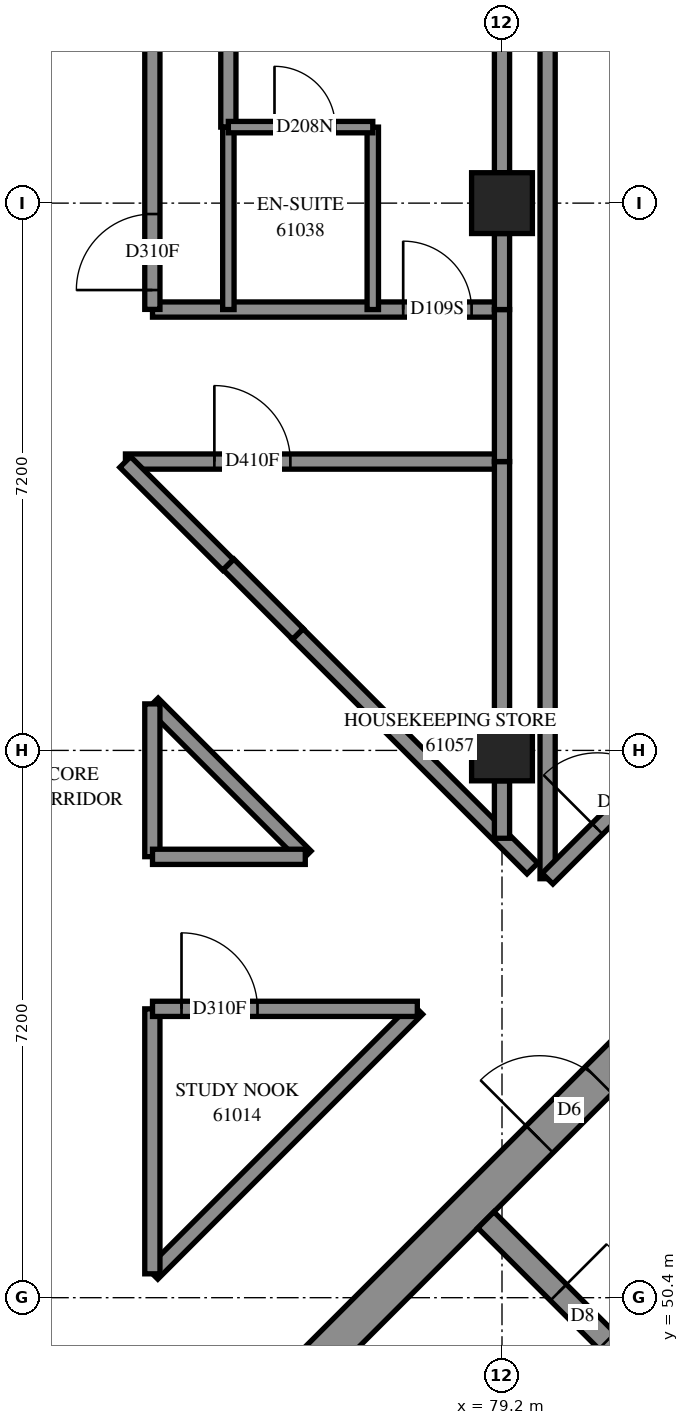
"""IFC4 building model, lengths in metres.
Left out: names, types, materials, properties, quantities, classifications, styles, units other than length and angle.
Written with IfcOpenShell. Run it as: python <this file> out.ifc"""

import sys

from ifc_helpers import new_model, si_unit, direction, frame, frame_2d, origin, origin_2d, place, context, subcontext, project, spatial, rectangle, extrude, element, fill, save


model = new_model("IFC4")
c1 = context("Model", 3, precision=1e-05, world=origin(), true_north=direction((0.0, 1.0)))
c2 = subcontext(c1, "Body", "Model", "MODEL_VIEW")
j1 = project(units=[si_unit("LENGTHUNIT", "METRE"), si_unit("PLANEANGLEUNIT", "RADIAN")], contexts=[c1])
p1 = place(None, origin())
s1 = spatial("IfcSite", under=j1, at=p1, CompositionType="ELEMENT")
p2 = place(p1, origin())
s2 = spatial("IfcBuilding", under=s1, at=p2, CompositionType="ELEMENT")
p3 = place(p2, frame((0.0, 0.0, 223.6)))
s3 = spatial("IfcBuildingStorey", under=s2, at=p3, CompositionType="ELEMENT", Elevation=223.6)
for number, where, z_axis, x_axis in (
    (1, (79.2, 57.6, 0.0), (0.0, 0.0, 1.0), (1.0, 0.0, 0.0)),
    (2, (79.2, 64.8, 0.0), (0.0, 0.0, 1.0), (1.0, 0.0, 0.0)),
):
    element("IfcColumn", number, at=place(p3, frame(where, z_axis=z_axis, x_axis=x_axis)), inside=s3, PredefinedType="COLUMN", context=c2, shape_type="SweptSolid", body=[
        extrude(rectangle(XDim=0.8, YDim=0.8, at=origin_2d()), origin(), (0.0, 0.0, 1.0), 3.1),
    ])
p4 = place(p3, frame((76.478, 49.267, -0.3), z_axis=(0.0, 0.0, 1.0), x_axis=(0.7071067812, 0.7071067812, 0.0)))
e3 = element("IfcWall", 3, at=p4, inside=s3, PredefinedType="SHEAR", context=c2, shape_type="SweptSolid", body=[
    extrude(rectangle(XDim=14.4, YDim=0.5, at=frame_2d((7.2, 0.0))), origin(), (0.0, 0.0, 1.0), 2.7),
])
p5 = place(p4, frame((4.55, 0.0, 0.3)))
e4 = element("IfcOpeningElement", 4, at=p5, cuts=e3, PredefinedType="OPENING", context=c2, shape_type="SweptSolid", body=[
    extrude(rectangle(XDim=1.1, YDim=2.1, at=frame_2d((0.55, 1.05))), frame((0.0, 0.26, 0.0), z_axis=(0.0, -1.0, 0.0), x_axis=(1.0, 0.0, 0.0)), (0.0, 0.0, 1.0), 0.52),
])
p6 = place(p4, frame((11.35, 0.0, 0.3)))
e5 = element("IfcOpeningElement", 5, at=p6, cuts=e3, PredefinedType="OPENING", context=c2, shape_type="SweptSolid", body=[
    extrude(rectangle(XDim=1.1, YDim=2.1, at=frame_2d((0.55, 1.05))), frame((0.0, 0.26, 0.0), z_axis=(0.0, -1.0, 0.0), x_axis=(1.0, 0.0, 0.0)), (0.0, 0.0, 1.0), 0.52),
])
p7 = place(p3, frame((78.988, 51.423, 0.0), z_axis=(0.0, 0.0, 1.0), x_axis=(0.7071067812, -0.7071067812, 0.0)))
e6 = element("IfcWall", 6, at=p7, inside=s3, PredefinedType="SOLIDWALL", context=c2, shape_type="SweptSolid", body=[
    extrude(rectangle(XDim=14.4, YDim=0.3, at=frame_2d((7.2, 0.0))), origin(), (0.0, 0.0, 1.0), 3.1),
])
p8 = place(p7, frame((1.35, 0.0, 0.0)))
e7 = element("IfcOpeningElement", 7, at=p8, cuts=e6, PredefinedType="OPENING", context=c2, shape_type="SweptSolid", body=[
    extrude(rectangle(XDim=0.9, YDim=2.1, at=frame_2d((0.45, 1.05))), frame((0.0, 0.16, 0.0), z_axis=(0.0, -1.0, 0.0), x_axis=(1.0, 0.0, 0.0)), (0.0, 0.0, 1.0), 0.32),
])
p9 = place(p7, frame((4.95, 0.0, 0.0)))
e8 = element("IfcOpeningElement", 8, at=p9, cuts=e6, PredefinedType="OPENING", context=c2, shape_type="SweptSolid", body=[
    extrude(rectangle(XDim=0.9, YDim=2.1, at=frame_2d((0.45, 1.05))), frame((0.0, 0.16, 0.0), z_axis=(0.0, -1.0, 0.0), x_axis=(1.0, 0.0, 0.0)), (0.0, 0.0, 1.0), 0.32),
])
p10 = place(p7, frame((8.55, 0.0, 0.0)))
e9 = element("IfcOpeningElement", 9, at=p10, cuts=e6, PredefinedType="OPENING", context=c2, shape_type="SweptSolid", body=[
    extrude(rectangle(XDim=0.9, YDim=2.1, at=frame_2d((0.45, 1.05))), frame((0.0, 0.16, 0.0), z_axis=(0.0, -1.0, 0.0), x_axis=(1.0, 0.0, 0.0)), (0.0, 0.0, 1.0), 0.32),
])
p11 = place(p7, frame((12.05, 0.0, 0.0)))
e10 = element("IfcOpeningElement", 10, at=p11, cuts=e6, PredefinedType="OPENING", context=c2, shape_type="SweptSolid", body=[
    extrude(rectangle(XDim=1.1, YDim=2.1, at=frame_2d((0.55, 1.05))), frame((0.0, 0.16, 0.0), z_axis=(0.0, -1.0, 0.0), x_axis=(1.0, 0.0, 0.0)), (0.0, 0.0, 1.0), 0.32),
])
p12 = place(p3, frame((79.8, 55.912, 0.0), z_axis=(0.0, 0.0, 1.0), x_axis=(0.0, 1.0, 0.0)))
e11 = element("IfcWall", 11, at=p12, inside=s3, PredefinedType="PARTITIONING", context=c2, shape_type="SweptSolid", body=[
    extrude(rectangle(XDim=11.596, YDim=0.2, at=frame_2d((5.798, 0.0))), origin(), (0.0, 0.0, 1.0), 3.1),
])
p13 = place(p3, frame((79.799, 55.913, 0.0), z_axis=(0.0, 0.0, 1.0), x_axis=(0.7071067812, 0.7071067812, 0.0)))
e12 = element("IfcWall", 12, at=p13, inside=s3, PredefinedType="PARTITIONING", context=c2, shape_type="SweptSolid", body=[
    extrude(rectangle(XDim=9.95, YDim=0.2, at=frame_2d((4.975, 0.0))), origin(), (0.0, 0.0, 1.0), 3.1),
])
p14 = place(p13, frame((0.927, 0.0, 0.0)))
e13 = element("IfcOpeningElement", 13, at=p14, cuts=e12, PredefinedType="OPENING", context=c2, shape_type="SweptSolid", body=[
    extrude(rectangle(XDim=1.0, YDim=2.1, at=frame_2d((0.5, 1.05))), frame((0.0, 0.11, 0.0), z_axis=(0.0, -1.0, 0.0), x_axis=(1.0, 0.0, 0.0)), (0.0, 0.0, 1.0), 0.22),
])
p15 = place(p3, frame((75.6, 65.8, 0.0), z_axis=(0.0, 0.0, 1.0), x_axis=(0.0, 1.0, 0.0)))
e14 = element("IfcWall", 14, at=p15, inside=s3, PredefinedType="PARTITIONING", context=c2, shape_type="SweptSolid", body=[
    extrude(rectangle(XDim=7.012, YDim=0.2, at=frame_2d((3.506, 0.0))), origin(), (0.0, 0.0, 1.0), 3.1),
])
p16 = place(p3, frame((79.2, 65.2, 0.0), z_axis=(0.0, 0.0, 1.0), x_axis=(0.0, 1.0, 0.0)))
e15 = element("IfcWall", 15, at=p16, inside=s3, PredefinedType="PARTITIONING", context=c2, shape_type="SweptSolid", body=[
    extrude(rectangle(XDim=6.4, YDim=0.2, at=frame_2d((3.2, 0.0))), origin(), (0.0, 0.0, 1.0), 3.1),
])
p17 = place(p3, frame((74.246, 61.4, 0.0), z_axis=(0.0, 0.0, 1.0), x_axis=(1.0, 0.0, 0.0)))
e16 = element("IfcWall", 16, at=p17, inside=s3, PredefinedType="PARTITIONING", context=c2, shape_type="SweptSolid", body=[
    extrude(rectangle(XDim=4.954, YDim=0.2, at=frame_2d((2.477, 0.0))), origin(), (0.0, 0.0, 1.0), 3.1),
])
p18 = place(p17, frame((1.17, 0.0, 0.0)))
e17 = element("IfcOpeningElement", 17, at=p18, cuts=e16, PredefinedType="OPENING", context=c2, shape_type="SweptSolid", body=[
    extrude(rectangle(XDim=1.0, YDim=2.1, at=frame_2d((0.5, 1.05))), frame((0.0, 0.11, 0.0), z_axis=(0.0, -1.0, 0.0), x_axis=(1.0, 0.0, 0.0)), (0.0, 0.0, 1.0), 0.22),
])
p19 = place(p3, frame((74.601, 50.715, 0.0), z_axis=(0.0, 0.0, 1.0), x_axis=(0.7071067812, 0.7071067812, 0.0)))
e18 = element("IfcWall", 18, at=p19, inside=s3, PredefinedType="PARTITIONING", context=c2, shape_type="SweptSolid", body=[
    extrude(rectangle(XDim=4.927, YDim=0.2, at=frame_2d((2.464, 0.0))), origin(), (0.0, 0.0, 1.0), 3.1),
])
p20 = place(p3, frame((74.602, 63.4, 0.0), z_axis=(0.0, 0.0, 1.0), x_axis=(1.0, 0.0, 0.0)))
e19 = element("IfcWall", 19, at=p20, inside=s3, PredefinedType="PARTITIONING", context=c2, shape_type="SweptSolid", body=[
    extrude(rectangle(XDim=4.598, YDim=0.2, at=frame_2d((2.299, 0.0))), origin(), (0.0, 0.0, 1.0), 3.1),
])
p21 = place(p20, frame((3.298, 0.0, 0.0)))
e20 = element("IfcOpeningElement", 20, at=p21, cuts=e19, PredefinedType="OPENING", context=c2, shape_type="SweptSolid", body=[
    extrude(rectangle(XDim=0.9, YDim=2.1, at=frame_2d((0.45, 1.05))), frame((0.0, 0.11, 0.0), z_axis=(0.0, -1.0, 0.0), x_axis=(1.0, 0.0, 0.0)), (0.0, 0.0, 1.0), 0.22),
])
p22 = place(p3, frame((76.513, 59.131, 0.0), z_axis=(0.0, 0.0, 1.0), x_axis=(0.7073587997, -0.7068546728, 0.0)))
e21 = element("IfcWall", 21, at=p22, inside=s3, PredefinedType="PARTITIONING", context=c2, shape_type="SweptSolid", body=[
    extrude(rectangle(XDim=4.364, YDim=0.2, at=frame_2d((2.182, 0.0))), origin(), (0.0, 0.0, 1.0), 3.1),
])
p23 = place(p3, frame((74.6, 63.402, 0.0), z_axis=(0.0, 0.0, 1.0), x_axis=(0.0, 1.0, 0.0)))
e22 = element("IfcWall", 22, at=p23, inside=s3, PredefinedType="PARTITIONING", context=c2, shape_type="SweptSolid", body=[
    extrude(rectangle(XDim=3.998, YDim=0.2, at=frame_2d((1.999, 0.0))), origin(), (0.0, 0.0, 1.0), 3.1),
])
p24 = place(p23, frame((0.255, 0.0, 0.0)))
e23 = element("IfcOpeningElement", 23, at=p24, cuts=e22, PredefinedType="OPENING", context=c2, shape_type="SweptSolid", body=[
    extrude(rectangle(XDim=1.0, YDim=2.1, at=frame_2d((0.5, 1.05))), frame((0.0, 0.11, 0.0), z_axis=(0.0, -1.0, 0.0), x_axis=(1.0, 0.0, 0.0)), (0.0, 0.0, 1.0), 0.22),
])
p25 = place(p3, frame((74.6, 50.714, 0.0), z_axis=(0.0, 0.0, 1.0), x_axis=(0.0, 1.0, 0.0)))
e24 = element("IfcWall", 24, at=p25, inside=s3, PredefinedType="PARTITIONING", context=c2, shape_type="SweptSolid", body=[
    extrude(rectangle(XDim=3.486, YDim=0.2, at=frame_2d((1.743, 0.0))), origin(), (0.0, 0.0, 1.0), 3.1),
])
p26 = place(p3, frame((74.602, 54.2, 0.0), z_axis=(0.0, 0.0, 1.0), x_axis=(1.0, 0.0, 0.0)))
e25 = element("IfcWall", 25, at=p26, inside=s3, PredefinedType="PARTITIONING", context=c2, shape_type="SweptSolid", body=[
    extrude(rectangle(XDim=3.484, YDim=0.2, at=frame_2d((1.742, 0.0))), origin(), (0.0, 0.0, 1.0), 3.1),
])
p27 = place(p26, frame((0.382, 0.0, 0.0)))
e26 = element("IfcOpeningElement", 26, at=p27, cuts=e25, PredefinedType="OPENING", context=c2, shape_type="SweptSolid", body=[
    extrude(rectangle(XDim=1.0, YDim=2.1, at=frame_2d((0.5, 1.05))), frame((0.0, 0.11, 0.0), z_axis=(0.0, -1.0, 0.0), x_axis=(1.0, 0.0, 0.0)), (0.0, 0.0, 1.0), 0.22),
])
p28 = place(p3, frame((79.2, 58.0, 0.0), z_axis=(0.0, 0.0, 1.0), x_axis=(0.0, 1.0, 0.0)))
e27 = element("IfcWall", 27, at=p28, inside=s3, PredefinedType="PARTITIONING", context=c2, shape_type="SweptSolid", body=[
    extrude(rectangle(XDim=3.4, YDim=0.2, at=frame_2d((1.7, 0.0))), origin(), (0.0, 0.0, 1.0), 3.1),
])
p29 = place(p3, frame((74.606, 58.218, 0.0), z_axis=(0.0, 0.0, 1.0), x_axis=(0.7071067812, -0.7071067812, 0.0)))
e28 = element("IfcWall", 28, at=p29, inside=s3, PredefinedType="PARTITIONING", context=c2, shape_type="SweptSolid", body=[
    extrude(rectangle(XDim=2.845, YDim=0.2, at=frame_2d((1.423, 0.0))), origin(), (0.0, 0.0, 1.0), 3.1),
])
for number, where, z_axis, x_axis in (
    (29, (75.6, 63.4, 0.0), (0.0, 0.0, 1.0), (0.0, 1.0, 0.0)),
    (30, (77.5, 63.4, 0.0), (0.0, 0.0, 1.0), (0.0, 1.0, 0.0)),
):
    element("IfcWall", number, at=place(p3, frame(where, z_axis=z_axis, x_axis=x_axis)), inside=s3, PredefinedType="PARTITIONING", context=c2, shape_type="SweptSolid", body=[
        extrude(rectangle(XDim=2.4, YDim=0.15, at=frame_2d((1.2, 0.0))), origin(), (0.0, 0.0, 1.0), 3.1),
    ])
for number, where, z_axis, x_axis in (
    (31, (74.6, 56.202, 0.0), (0.0, 0.0, 1.0), (0.0, 1.0, 0.0)),
    (32, (74.602, 56.2, 0.0), (0.0, 0.0, 1.0), (1.0, 0.0, 0.0)),
):
    element("IfcWall", number, at=place(p3, frame(where, z_axis=z_axis, x_axis=x_axis)), inside=s3, PredefinedType="PARTITIONING", context=c2, shape_type="SweptSolid", body=[
        extrude(rectangle(XDim=2.01, YDim=0.2, at=frame_2d((1.005, 0.0))), origin(), (0.0, 0.0, 1.0), 3.1),
    ])
p30 = place(p3, frame((79.2, 61.4, 0.0), z_axis=(0.0, 0.0, 1.0), x_axis=(0.0, 1.0, 0.0)))
e33 = element("IfcWall", 33, at=p30, inside=s3, PredefinedType="PARTITIONING", context=c2, shape_type="SweptSolid", body=[
    extrude(rectangle(XDim=2.0, YDim=0.2, at=frame_2d((1.0, 0.0))), origin(), (0.0, 0.0, 1.0), 3.1),
])
p31 = place(p3, frame((74.243, 61.395, 0.0), z_axis=(0.0, 0.0, 1.0), x_axis=(0.7071067812, -0.7071067812, 0.0)))
e34 = element("IfcWall", 34, at=p31, inside=s3, PredefinedType="PARTITIONING", context=c2, shape_type="SweptSolid", body=[
    extrude(rectangle(XDim=1.915, YDim=0.2, at=frame_2d((0.957, 0.0))), origin(), (0.0, 0.0, 1.0), 3.1),
])
p32 = place(p3, frame((75.6, 65.8, 0.0), z_axis=(0.0, 0.0, 1.0), x_axis=(1.0, 0.0, 0.0)))
e35 = element("IfcWall", 35, at=p32, inside=s3, PredefinedType="PARTITIONING", context=c2, shape_type="SweptSolid", body=[
    extrude(rectangle(XDim=1.9, YDim=0.15, at=frame_2d((0.95, 0.0))), origin(), (0.0, 0.0, 1.0), 3.1),
])
p33 = place(p32, frame((0.607, 0.0, 0.0)))
e36 = element("IfcOpeningElement", 36, at=p33, cuts=e35, PredefinedType="OPENING", context=c2, shape_type="SweptSolid", body=[
    extrude(rectangle(XDim=0.8, YDim=2.1, at=frame_2d((0.4, 1.05))), frame((0.0, 0.085, 0.0), z_axis=(0.0, -1.0, 0.0), x_axis=(1.0, 0.0, 0.0)), (0.0, 0.0, 1.0), 0.17),
])
p34 = place(p3, frame((75.602, 60.046, 0.0), z_axis=(0.0, 0.0, 1.0), x_axis=(0.7063318703, -0.7078808437, 0.0)))
e37 = element("IfcWall", 37, at=p34, inside=s3, PredefinedType="PARTITIONING", context=c2, shape_type="SweptSolid", body=[
    extrude(rectangle(XDim=1.291, YDim=0.2, at=frame_2d((0.646, 0.0))), origin(), (0.0, 0.0, 1.0), 3.1),
])
p35 = place(p3, frame((79.2, 63.4, 0.0), z_axis=(0.0, 0.0, 1.0), x_axis=(0.0, 1.0, 0.0)))
e38 = element("IfcWall", 38, at=p35, inside=s3, PredefinedType="PARTITIONING", context=c2, shape_type="SweptSolid", body=[
    extrude(rectangle(XDim=1.0, YDim=0.2, at=frame_2d((0.5, 0.0))), origin(), (0.0, 0.0, 1.0), 3.1),
])
p36 = place(p3, frame((79.2, 56.444, 0.0), z_axis=(0.0, 0.0, 1.0), x_axis=(0.0, 1.0, 0.0)))
e39 = element("IfcWall", 39, at=p36, inside=s3, PredefinedType="PARTITIONING", context=c2, shape_type="SweptSolid", body=[
    extrude(rectangle(XDim=0.756, YDim=0.2, at=frame_2d((0.378, 0.0))), origin(), (0.0, 0.0, 1.0), 3.1),
])
p37 = place(p5, origin())
e40 = element("IfcDoor", 40, at=p37, inside=s3, OperationType="DOUBLE_DOOR_SINGLE_SWING", PredefinedType="DOOR", context=c2, shape_type="SweptSolid", body=[
    extrude(rectangle(XDim=1.1, YDim=2.1, at=frame_2d((0.55, 1.05))), frame((0.0, 0.025, 0.0), z_axis=(0.0, -1.0, 0.0), x_axis=(1.0, 0.0, 0.0)), (0.0, 0.0, 1.0), 0.05),
])
fill(e4, e40)
p38 = place(p8, origin())
e41 = element("IfcDoor", 41, at=p38, inside=s3, OperationType="SINGLE_SWING_LEFT", PredefinedType="DOOR", context=c2, shape_type="SweptSolid", body=[
    extrude(rectangle(XDim=0.9, YDim=2.1, at=frame_2d((0.45, 1.05))), frame((0.0, 0.025, 0.0), z_axis=(0.0, -1.0, 0.0), x_axis=(1.0, 0.0, 0.0)), (0.0, 0.0, 1.0), 0.05),
])
fill(e7, e41)
p39 = place(p27, origin())
e42 = element("IfcDoor", 42, at=p39, inside=s3, OperationType="SINGLE_SWING_RIGHT", PredefinedType="DOOR", context=c2, shape_type="SweptSolid", body=[
    extrude(rectangle(XDim=1.0, YDim=2.1, at=frame_2d((0.5, 1.05))), frame((0.0, 0.025, 0.0), z_axis=(0.0, -1.0, 0.0), x_axis=(1.0, 0.0, 0.0)), (0.0, 0.0, 1.0), 0.05),
])
fill(e26, e42)
p40 = place(p24, origin())
e43 = element("IfcDoor", 43, at=p40, inside=s3, OperationType="SINGLE_SWING_RIGHT", PredefinedType="DOOR", context=c2, shape_type="SweptSolid", body=[
    extrude(rectangle(XDim=1.0, YDim=2.1, at=frame_2d((0.5, 1.05))), frame((0.0, 0.025, 0.0), z_axis=(0.0, -1.0, 0.0), x_axis=(1.0, 0.0, 0.0)), (0.0, 0.0, 1.0), 0.05),
])
fill(e23, e43)
p41 = place(p21, origin())
e44 = element("IfcDoor", 44, at=p41, inside=s3, OperationType="SINGLE_SWING_LEFT", PredefinedType="DOOR", context=c2, shape_type="SweptSolid", body=[
    extrude(rectangle(XDim=0.9, YDim=2.1, at=frame_2d((0.45, 1.05))), frame((0.0, 0.025, 0.0), z_axis=(0.0, -1.0, 0.0), x_axis=(1.0, 0.0, 0.0)), (0.0, 0.0, 1.0), 0.05),
])
fill(e20, e44)
p42 = place(p33, origin())
e45 = element("IfcDoor", 45, at=p42, inside=s3, OperationType="SINGLE_SWING_RIGHT", PredefinedType="DOOR", context=c2, shape_type="SweptSolid", body=[
    extrude(rectangle(XDim=0.8, YDim=2.1, at=frame_2d((0.4, 1.05))), frame((0.0, 0.025, 0.0), z_axis=(0.0, -1.0, 0.0), x_axis=(1.0, 0.0, 0.0)), (0.0, 0.0, 1.0), 0.05),
])
fill(e36, e45)
p43 = place(p18, origin())
e46 = element("IfcDoor", 46, at=p43, inside=s3, OperationType="SINGLE_SWING_RIGHT", PredefinedType="DOOR", context=c2, shape_type="SweptSolid", body=[
    extrude(rectangle(XDim=1.0, YDim=2.1, at=frame_2d((0.5, 1.05))), frame((0.0, 0.025, 0.0), z_axis=(0.0, -1.0, 0.0), x_axis=(1.0, 0.0, 0.0)), (0.0, 0.0, 1.0), 0.05),
])
fill(e17, e46)
p44 = place(p14, origin())
e47 = element("IfcDoor", 47, at=p44, inside=s3, OperationType="SINGLE_SWING_RIGHT", PredefinedType="DOOR", context=c2, shape_type="SweptSolid", body=[
    extrude(rectangle(XDim=1.0, YDim=2.1, at=frame_2d((0.5, 1.05))), frame((0.0, 0.025, 0.0), z_axis=(0.0, -1.0, 0.0), x_axis=(1.0, 0.0, 0.0)), (0.0, 0.0, 1.0), 0.05),
])
fill(e13, e47)
save(model, sys.argv[1])
